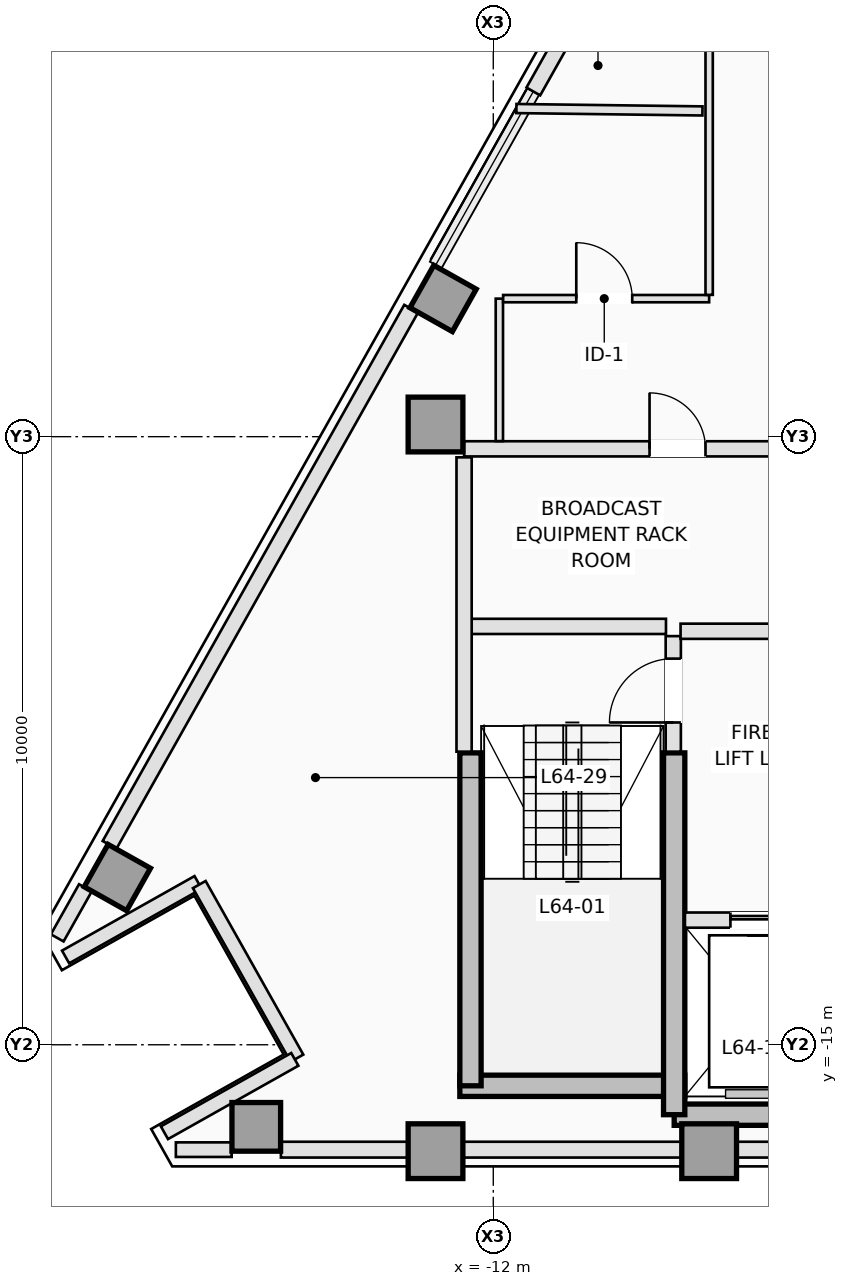
"""IFC4 building model, lengths in metres.
Left out: names, types, materials, properties, quantities, classifications, styles, units other than length and angle.
Written with IfcOpenShell. Run it as: python <this file> out.ifc"""

import sys

from ifc_helpers import new_model, si_unit, direction, frame, frame_2d, origin, origin_2d, place, context, subcontext, project, spatial, rectangle, extrude, element, fill, save


model = new_model("IFC4")
c1 = context("Model", 3, precision=1e-05, world=origin(), true_north=direction((0.0, 1.0)))
c2 = subcontext(c1, "Body", "Model", "MODEL_VIEW")
j1 = project(units=[si_unit("LENGTHUNIT", "METRE"), si_unit("PLANEANGLEUNIT", "RADIAN")], contexts=[c1])
p1 = place(None, origin())
s1 = spatial("IfcSite", under=j1, at=p1, CompositionType="ELEMENT")
p2 = place(p1, origin())
s2 = spatial("IfcBuilding", under=s1, at=p2, CompositionType="ELEMENT")
p3 = place(p2, frame((0.0, 0.0, 232.4)))
s3 = spatial("IfcBuildingStorey", under=s2, at=p3, CompositionType="ELEMENT", Elevation=232.4)
p4 = place(p3, frame((-12.55, -15.675, 0.0), z_axis=(0.0, 0.0, 1.0), x_axis=(1.0, 0.0, 0.0)))
e1 = element("IfcWall", 1, at=p4, inside=s3, PredefinedType="SHEAR", context=c2, shape_type="SweptSolid", body=[
    extrude(rectangle(XDim=3.7, YDim=0.35, at=frame_2d((1.85, 0.0))), origin(), (0.0, 0.0, 1.0), 3.5),
])
p5 = place(p3, frame((-9.025, -16.15, 0.0), z_axis=(0.0, 0.0, 1.0), x_axis=(1.0, 0.0, 0.0)))
e2 = element("IfcWall", 2, at=p5, inside=s3, PredefinedType="SHEAR", context=c2, shape_type="SweptSolid", body=[
    extrude(rectangle(XDim=5.275, YDim=0.35, at=frame_2d((2.637, 0.0))), origin(), (0.0, 0.0, 1.0), 3.5),
])
p6 = place(p3, frame((-12.375, -15.675, 0.0), z_axis=(0.0, 0.0, 1.0), x_axis=(0.0, 1.0, 0.0)))
e3 = element("IfcWall", 3, at=p6, inside=s3, PredefinedType="SHEAR", context=c2, shape_type="SweptSolid", body=[
    extrude(rectangle(XDim=5.475, YDim=0.35, at=frame_2d((2.738, 0.0))), origin(), (0.0, 0.0, 1.0), 3.5),
])
p7 = place(p3, frame((-9.025, -16.15, 0.0), z_axis=(0.0, 0.0, 1.0), x_axis=(0.0, 1.0, 0.0)))
e4 = element("IfcWall", 4, at=p7, inside=s3, PredefinedType="SHEAR", context=c2, shape_type="SweptSolid", body=[
    extrude(rectangle(XDim=5.95, YDim=0.35, at=frame_2d((2.975, 0.0))), origin(), (0.0, 0.0, 1.0), 3.5),
])
for number, where, z_axis, x_axis in (
    (5, (-12.95, -16.75, 0.0), (0.0, 0.0, 1.0), (1.0, 0.0, 0.0)),
    (6, (-8.45, -16.75, 0.0), (0.0, 0.0, 1.0), (1.0, 0.0, 0.0)),
    (7, (-12.95, -4.8, 0.0), (0.0, 0.0, 1.0), (1.0, 0.0, 0.0)),
):
    element("IfcColumn", number, at=place(p3, frame(where, z_axis=z_axis, x_axis=x_axis)), inside=s3, PredefinedType="COLUMN", context=c2, shape_type="SweptSolid", body=[
        extrude(rectangle(XDim=0.9, YDim=0.9, at=origin_2d()), origin(), (0.0, 0.0, 1.0), 3.5),
    ])
for number, where, z_axis, x_axis in (
    (8, (-15.898, -16.35, 0.0), (0.0, 0.0, 1.0), (0.0, 1.0, 0.0)),
    (9, (-12.825, -2.727, 0.0), (0.0, 0.0, 1.0), (-0.872, 0.49, 0.0)),
    (10, (-18.182, -12.25, 0.0), (0.0, 0.0, 1.0), (-0.872, 0.49, 0.0)),
):
    element("IfcColumn", number, at=place(p3, frame(where, z_axis=z_axis, x_axis=x_axis)), inside=s3, PredefinedType="COLUMN", context=c2, shape_type="SweptSolid", body=[
        extrude(rectangle(XDim=0.8, YDim=0.8, at=origin_2d()), origin(), (0.0, 0.0, 1.0), 3.5),
    ])
p8 = place(p3, frame((-16.302, -16.725, 0.0), z_axis=(0.0, 0.0, 1.0), x_axis=(-1.0, 0.0, 0.0)))
e11 = element("IfcWall", 11, at=p8, inside=s3, PredefinedType="STANDARD", context=c2, shape_type="SweptSolid", body=[
    extrude(rectangle(XDim=0.917, YDim=0.24, at=frame_2d((0.459, 0.0))), origin(), (0.0, 0.0, 1.0), 3.25),
])
p9 = place(p3, frame((-4.22, -16.725, 0.0), z_axis=(0.0, 0.0, 1.0), x_axis=(-1.0, 0.0, 0.0)))
e12 = element("IfcWall", 12, at=p9, inside=s3, PredefinedType="STANDARD", context=c2, shape_type="SweptSolid", body=[
    extrude(rectangle(XDim=11.273, YDim=0.26, at=frame_2d((5.636, 0.0))), origin(), (0.0, 0.0, 1.0), 2.79),
])
p10 = place(p3, frame((-19.171, -13.242, 0.0), z_axis=(0.0, 0.0, 1.0), x_axis=(0.490199895283, 0.871610040479, 0.0)))
e13 = element("IfcWall", 13, at=p10, inside=s3, PredefinedType="STANDARD", context=c2, shape_type="SweptSolid", body=[
    extrude(rectangle(XDim=0.945, YDim=0.24, at=frame_2d((0.472, 0.0))), origin(), (0.0, 0.0, 1.0), 3.25),
])
p11 = place(p3, frame((-18.311, -11.713, 0.0), z_axis=(0.0, 0.0, 1.0), x_axis=(0.490266968583, 0.871572314565, 0.0)))
e14 = element("IfcWall", 14, at=p11, inside=s3, PredefinedType="STANDARD", context=c2, shape_type="SweptSolid", body=[
    extrude(rectangle(XDim=10.116, YDim=0.26, at=frame_2d((5.058, 0.0))), origin(), (0.0, 0.0, 1.0), 3.25),
])
p12 = place(p3, frame((-11.341, 0.677, 0.0), z_axis=(0.0, 0.0, 1.0), x_axis=(0.490268515903, 0.871571444182, 0.0)))
e15 = element("IfcWall", 15, at=p12, inside=s3, PredefinedType="STANDARD", context=c2, shape_type="SweptSolid", body=[
    extrude(rectangle(XDim=3.186, YDim=0.26, at=frame_2d((1.593, 0.0))), origin(), (0.0, 0.0, 1.0), 3.25),
])
p13 = place(p3, frame((-19.033, -13.556, 0.0), z_axis=(0.0, 0.0, 1.0), x_axis=(0.871588577066, 0.490238056792, 0.0)))
e16 = element("IfcWall", 16, at=p13, inside=s3, PredefinedType="STANDARD", context=c2, shape_type="SweptSolid", body=[
    extrude(rectangle(XDim=2.5, YDim=0.24, at=frame_2d((1.25, 0.0))), origin(), (0.0, 0.0, 1.0), 3.25),
])
p14 = place(p3, frame((-16.835, -12.366, 0.0), z_axis=(0.0, 0.0, 1.0), x_axis=(0.490293083368, -0.871557624258, 0.0)))
e17 = element("IfcWall", 17, at=p14, inside=s3, PredefinedType="STANDARD", context=c2, shape_type="SweptSolid", body=[
    extrude(rectangle(XDim=3.276, YDim=0.24, at=frame_2d((1.638, 0.0))), origin(), (0.0, 0.0, 1.0), 2.79),
])
p15 = place(p3, frame((-15.264, -15.24, 0.0), z_axis=(0.0, 0.0, 1.0), x_axis=(-0.87157023615, -0.490270663468, 0.0)))
e18 = element("IfcWall", 18, at=p15, inside=s3, PredefinedType="STANDARD", context=c2, shape_type="SweptSolid", body=[
    extrude(rectangle(XDim=2.46, YDim=0.24, at=frame_2d((1.23, 0.0))), origin(), (0.0, 0.0, 1.0), 3.25),
])
p16 = place(p3, frame((-9.04, -10.18, 0.0), z_axis=(0.0, 0.0, 1.0), x_axis=(0.0, 1.0, 0.0)))
e19 = element("IfcWall", 19, at=p16, inside=s3, PredefinedType="PARTITIONING", context=c2, shape_type="SweptSolid", body=[
    extrude(rectangle(XDim=1.9, YDim=0.25, at=frame_2d((0.95, 0.0))), origin(), (0.0, 0.0, 1.0), 3.25),
])
p17 = place(p16, frame((0.48, 0.0, 0.0)))
e20 = element("IfcOpeningElement", 20, at=p17, cuts=e19, PredefinedType="OPENING", context=c2, shape_type="SweptSolid", body=[
    extrude(rectangle(XDim=1.05, YDim=2.15, at=frame_2d((0.525, 1.075))), frame((0.0, 0.135, 0.0), z_axis=(0.0, -1.0, 0.0), x_axis=(1.0, 0.0, 0.0)), (0.0, 0.0, 1.0), 0.27),
])
p18 = place(p3, frame((-12.38, -8.12, 0.0), z_axis=(0.0, 0.0, 1.0), x_axis=(1.0, 0.0, 0.0)))
e21 = element("IfcWall", 21, at=p18, inside=s3, PredefinedType="PARTITIONING", context=c2, shape_type="SweptSolid", body=[
    extrude(rectangle(XDim=3.22, YDim=0.25, at=frame_2d((1.61, 0.0))), origin(), (0.0, 0.0, 1.0), 3.25),
])
p19 = place(p3, frame((-12.48, -10.18, 0.0), z_axis=(0.0, 0.0, 1.0), x_axis=(0.0, 1.0, 0.0)))
e22 = element("IfcWall", 22, at=p19, inside=s3, PredefinedType="PARTITIONING", context=c2, shape_type="SweptSolid", body=[
    extrude(rectangle(XDim=4.84, YDim=0.25, at=frame_2d((2.42, 0.0))), origin(), (0.0, 0.0, 1.0), 3.25),
])
p20 = place(p3, frame((-8.848, -12.95, 0.0), z_axis=(0.0, 0.0, 1.0), x_axis=(1.0, 0.0, 0.0)))
e23 = element("IfcWall", 23, at=p20, inside=s3, PredefinedType="PARTITIONING", context=c2, shape_type="SweptSolid", body=[
    extrude(rectangle(XDim=5.168, YDim=0.25, at=frame_2d((2.584, 0.0))), origin(), (0.0, 0.0, 1.0), 3.25),
])
p21 = place(p20, frame((0.748, 0.0, 0.0)))
e24 = element("IfcOpeningElement", 24, at=p21, cuts=e23, PredefinedType="OPENING", context=c2, shape_type="SweptSolid", body=[
    extrude(rectangle(XDim=1.1, YDim=2.15, at=frame_2d((0.55, 1.075))), frame((0.0, 0.135, 0.0), z_axis=(0.0, -1.0, 0.0), x_axis=(1.0, 0.0, 0.0)), (0.0, 0.0, 1.0), 0.27),
])
p22 = place(p20, frame((2.648, 0.0, 0.0)))
e25 = element("IfcOpeningElement", 25, at=p22, cuts=e23, PredefinedType="OPENING", context=c2, shape_type="SweptSolid", body=[
    extrude(rectangle(XDim=0.88, YDim=2.1, at=frame_2d((0.44, 1.05))), frame((0.0, 0.135, 0.0), z_axis=(0.0, -1.0, 0.0), x_axis=(1.0, 0.0, 0.0)), (0.0, 0.0, 1.0), 0.27),
])
p23 = place(p20, frame((4.048, 0.0, 0.0)))
e26 = element("IfcOpeningElement", 26, at=p23, cuts=e23, PredefinedType="OPENING", context=c2, shape_type="SweptSolid", body=[
    extrude(rectangle(XDim=0.88, YDim=2.1, at=frame_2d((0.44, 1.05))), frame((0.0, 0.135, 0.0), z_axis=(0.0, -1.0, 0.0), x_axis=(1.0, 0.0, 0.0)), (0.0, 0.0, 1.0), 0.27),
])
p24 = place(p3, frame((-8.92, -8.2, 0.0), z_axis=(0.0, 0.0, 1.0), x_axis=(1.0, 0.0, 0.0)))
e27 = element("IfcWall", 27, at=p24, inside=s3, PredefinedType="PARTITIONING", context=c2, shape_type="SweptSolid", body=[
    extrude(rectangle(XDim=5.24, YDim=0.25, at=frame_2d((2.62, 0.0))), origin(), (0.0, 0.0, 1.0), 3.25),
])
p25 = place(p3, frame((-12.48, -5.2, 0.0), z_axis=(0.0, 0.0, 1.0), x_axis=(1.0, 0.0, 0.0)))
e28 = element("IfcWall", 28, at=p25, inside=s3, PredefinedType="PARTITIONING", context=c2, shape_type="SweptSolid", body=[
    extrude(rectangle(XDim=8.278, YDim=0.25, at=frame_2d((4.139, 0.0))), origin(), (0.0, 0.0, 1.0), 3.25),
])
p26 = place(p25, frame((3.05, 0.0, 0.0)))
e29 = element("IfcOpeningElement", 29, at=p26, cuts=e28, PredefinedType="OPENING", context=c2, shape_type="SweptSolid", body=[
    extrude(rectangle(XDim=0.92, YDim=2.12, at=frame_2d((0.46, 1.06))), frame((0.0, 0.135, 0.0), z_axis=(0.0, -1.0, 0.0), x_axis=(1.0, 0.0, 0.0)), (0.0, 0.0, 1.0), 0.27),
])
p27 = place(p25, frame((6.15, 0.0, 0.0)))
e30 = element("IfcOpeningElement", 30, at=p27, cuts=e28, PredefinedType="OPENING", context=c2, shape_type="SweptSolid", body=[
    extrude(rectangle(XDim=0.92, YDim=2.12, at=frame_2d((0.46, 1.06))), frame((0.0, 0.135, 0.0), z_axis=(0.0, -1.0, 0.0), x_axis=(1.0, 0.0, 0.0)), (0.0, 0.0, 1.0), 0.27),
])
p28 = place(p3, frame((-11.9, -5.073, 0.0), z_axis=(0.0, 0.0, 1.0), x_axis=(0.0, 1.0, 0.0)))
e31 = element("IfcWall", 31, at=p28, inside=s3, PredefinedType="PARTITIONING", context=c2, shape_type="SweptSolid", body=[
    extrude(rectangle(XDim=2.343, YDim=0.12, at=frame_2d((1.171, 0.0))), origin(), (0.0, 0.0, 1.0), 3.25),
])
p29 = place(p3, frame((-11.838, -2.73, 0.0), z_axis=(0.0, 0.0, 1.0), x_axis=(1.0, 0.0, 0.0)))
e32 = element("IfcWall", 32, at=p29, inside=s3, PredefinedType="PARTITIONING", context=c2, shape_type="SweptSolid", body=[
    extrude(rectangle(XDim=3.388, YDim=0.12, at=frame_2d((1.694, 0.0))), origin(), (0.0, 0.0, 1.0), 3.25),
])
p30 = place(p29, frame((1.203, 0.0, 0.0)))
e33 = element("IfcOpeningElement", 33, at=p30, cuts=e32, PredefinedType="OPENING", context=c2, shape_type="SweptSolid", body=[
    extrude(rectangle(XDim=0.92, YDim=2.12, at=frame_2d((0.46, 1.06))), frame((0.0, 0.07, 0.0), z_axis=(0.0, -1.0, 0.0), x_axis=(1.0, 0.0, 0.0)), (0.0, 0.0, 1.0), 0.14),
])
p31 = place(p3, frame((-8.45, -2.668, 0.0), z_axis=(0.0, 0.0, 1.0), x_axis=(0.0, 1.0, 0.0)))
e34 = element("IfcWall", 34, at=p31, inside=s3, PredefinedType="PARTITIONING", context=c2, shape_type="SweptSolid", body=[
    extrude(rectangle(XDim=6.21, YDim=0.12, at=frame_2d((3.105, 0.0))), origin(), (0.0, 0.0, 1.0), 3.25),
])
p32 = place(p31, frame((4.047, 0.0, 0.0)))
e35 = element("IfcOpeningElement", 35, at=p32, cuts=e34, PredefinedType="OPENING", context=c2, shape_type="SweptSolid", body=[
    extrude(rectangle(XDim=0.92, YDim=2.12, at=frame_2d((0.46, 1.06))), frame((0.0, 0.07, 0.0), z_axis=(0.0, -1.0, 0.0), x_axis=(1.0, 0.0, 0.0)), (0.0, 0.0, 1.0), 0.14),
])
p33 = place(p3, frame((-8.56, 0.357, 0.0), z_axis=(0.0, 0.0, 1.0), x_axis=(-0.999917486078, 0.012846051329, 0.0)))
e36 = element("IfcWall", 36, at=p33, inside=s3, PredefinedType="PARTITIONING", context=c2, shape_type="SweptSolid", body=[
    extrude(rectangle(XDim=3.06, YDim=0.15, at=frame_2d((1.53, 0.0))), origin(), (0.0, 0.0, 1.0), 3.25),
])
p34 = place(p21, origin())
e37 = element("IfcDoor", 37, at=p34, inside=s3, OperationType="SLIDING_TO_LEFT", PredefinedType="DOOR", context=c2, shape_type="SweptSolid", body=[
    extrude(rectangle(XDim=1.1, YDim=2.15, at=frame_2d((0.55, 1.075))), frame((0.0, 0.025, 0.0), z_axis=(0.0, -1.0, 0.0), x_axis=(1.0, 0.0, 0.0)), (0.0, 0.0, 1.0), 0.05),
])
fill(e24, e37)
p35 = place(p17, origin())
e38 = element("IfcDoor", 38, at=p35, inside=s3, OperationType="SINGLE_SWING_LEFT", PredefinedType="DOOR", context=c2, shape_type="SweptSolid", body=[
    extrude(rectangle(XDim=1.05, YDim=2.15, at=frame_2d((0.525, 1.075))), frame((0.0, 0.025, 0.0), z_axis=(0.0, -1.0, 0.0), x_axis=(1.0, 0.0, 0.0)), (0.0, 0.0, 1.0), 0.05),
])
fill(e20, e38)
p36 = place(p26, origin())
e39 = element("IfcDoor", 39, at=p36, inside=s3, OperationType="SINGLE_SWING_LEFT", PredefinedType="DOOR", context=c2, shape_type="SweptSolid", body=[
    extrude(rectangle(XDim=0.92, YDim=2.12, at=frame_2d((0.46, 1.06))), frame((0.0, 0.025, 0.0), z_axis=(0.0, -1.0, 0.0), x_axis=(1.0, 0.0, 0.0)), (0.0, 0.0, 1.0), 0.05),
])
fill(e29, e39)
p37 = place(p30, origin())
e40 = element("IfcDoor", 40, at=p37, inside=s3, OperationType="SINGLE_SWING_LEFT", PredefinedType="DOOR", context=c2, shape_type="SweptSolid", body=[
    extrude(rectangle(XDim=0.92, YDim=2.12, at=frame_2d((0.46, 1.06))), frame((0.0, 0.025, 0.0), z_axis=(0.0, -1.0, 0.0), x_axis=(1.0, 0.0, 0.0)), (0.0, 0.0, 1.0), 0.05),
])
fill(e33, e40)
save(model, sys.argv[1])
